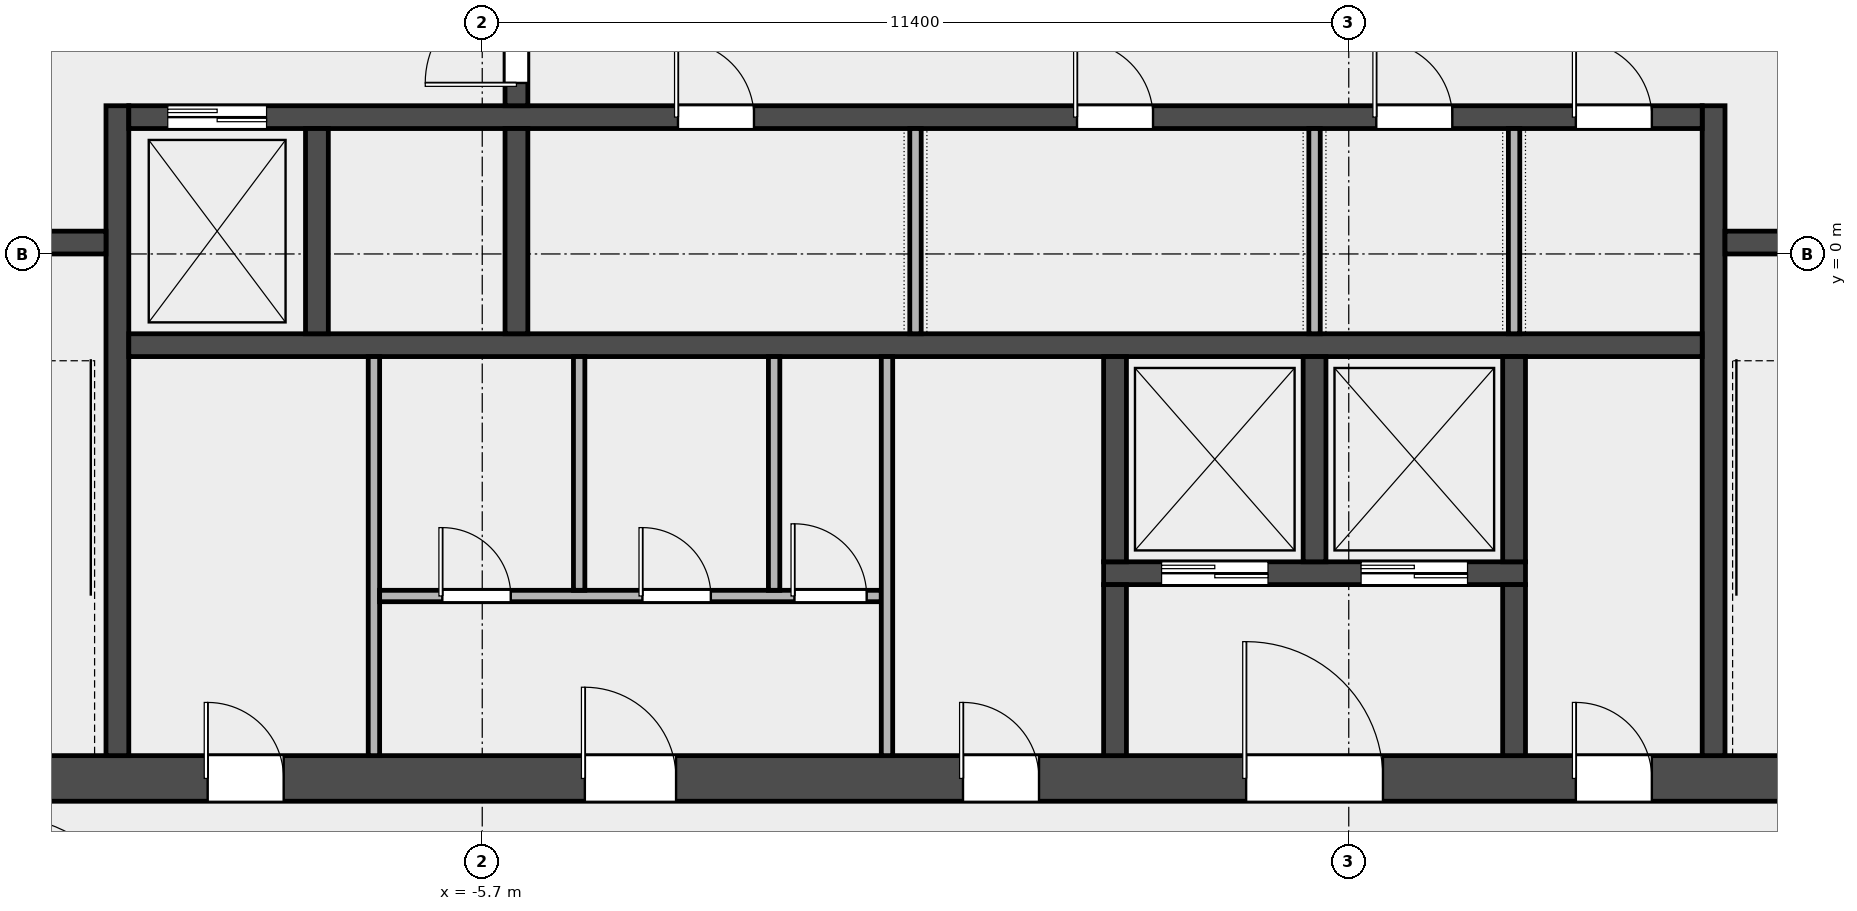
"""IFC4 building model, lengths in metres.
Left out: names, types, materials, properties, quantities, classifications, styles, units other than length and angle.
Written with IfcOpenShell. Run it as: python <this file> out.ifc"""

import sys

from ifc_helpers import new_model, si_unit, direction, frame, frame_2d, origin, place, context, subcontext, project, spatial, rectangle, extrude, element, fill, save


model = new_model("IFC4")
c1 = context("Model", 3, precision=1e-05, world=origin(), true_north=direction((0.0, 1.0)))
c2 = subcontext(c1, "Body", "Model", "MODEL_VIEW")
j1 = project(units=[si_unit("LENGTHUNIT", "METRE"), si_unit("PLANEANGLEUNIT", "RADIAN")], contexts=[c1])
p1 = place(None, origin())
s1 = spatial("IfcSite", under=j1, at=p1, CompositionType="ELEMENT")
p2 = place(p1, origin())
s2 = spatial("IfcBuilding", under=s1, at=p2, CompositionType="ELEMENT")
p3 = place(p2, frame((0.0, 0.0, 219.0)))
s3 = spatial("IfcBuildingStorey", under=s2, at=p3, CompositionType="ELEMENT", Elevation=219.0)
p4 = place(p3, frame((-14.4, -6.9, 0.0), z_axis=(0.0, 0.0, 1.0), x_axis=(1.0, 0.0, 0.0)))
e1 = element("IfcWall", 1, at=p4, inside=s3, PredefinedType="SHEAR", context=c2, shape_type="SweptSolid", body=[
    extrude(rectangle(XDim=28.8, YDim=0.6, at=frame_2d((14.4, 0.0))), origin(), (0.0, 0.0, 1.0), 3.7),
])
p5 = place(p4, frame((5.087, 0.0, 0.0)))
e2 = element("IfcOpeningElement", 2, at=p5, cuts=e1, PredefinedType="OPENING", context=c2, shape_type="SweptSolid", body=[
    extrude(rectangle(XDim=1.0, YDim=2.1, at=frame_2d((0.5, 1.05))), frame((0.0, 0.312, 0.0), z_axis=(0.0, -1.0, 0.0), x_axis=(1.0, 0.0, 0.0)), (0.0, 0.0, 1.0), 0.624),
])
p6 = place(p4, frame((10.05, 0.0, 0.0)))
e3 = element("IfcOpeningElement", 3, at=p6, cuts=e1, PredefinedType="OPENING", context=c2, shape_type="SweptSolid", body=[
    extrude(rectangle(XDim=1.2, YDim=2.1, at=frame_2d((0.6, 1.05))), frame((0.0, 0.312, 0.0), z_axis=(0.0, -1.0, 0.0), x_axis=(1.0, 0.0, 0.0)), (0.0, 0.0, 1.0), 0.624),
])
p7 = place(p4, frame((15.025, 0.0, 0.0)))
e4 = element("IfcOpeningElement", 4, at=p7, cuts=e1, PredefinedType="OPENING", context=c2, shape_type="SweptSolid", body=[
    extrude(rectangle(XDim=1.0, YDim=2.1, at=frame_2d((0.5, 1.05))), frame((0.0, 0.312, 0.0), z_axis=(0.0, -1.0, 0.0), x_axis=(1.0, 0.0, 0.0)), (0.0, 0.0, 1.0), 0.624),
])
p8 = place(p4, frame((18.75, 0.0, 0.0)))
e5 = element("IfcOpeningElement", 5, at=p8, cuts=e1, PredefinedType="OPENING", context=c2, shape_type="SweptSolid", body=[
    extrude(rectangle(XDim=1.8, YDim=2.1, at=frame_2d((0.9, 1.05))), frame((0.0, 0.312, 0.0), z_axis=(0.0, -1.0, 0.0), x_axis=(1.0, 0.0, 0.0)), (0.0, 0.0, 1.0), 0.624),
])
p9 = place(p4, frame((23.087, 0.0, 0.0)))
e6 = element("IfcOpeningElement", 6, at=p9, cuts=e1, PredefinedType="OPENING", context=c2, shape_type="SweptSolid", body=[
    extrude(rectangle(XDim=1.0, YDim=2.1, at=frame_2d((0.5, 1.05))), frame((0.0, 0.312, 0.0), z_axis=(0.0, -1.0, 0.0), x_axis=(1.0, 0.0, 0.0)), (0.0, 0.0, 1.0), 0.624),
])
for number, where, z_axis, x_axis in (
    (7, (-10.5, -6.6, 0.0), (0.0, 0.0, 1.0), (0.0, 1.0, 0.0)),
    (8, (10.5, -6.6, 0.0), (0.0, 0.0, 1.0), (0.0, 1.0, 0.0)),
):
    element("IfcWall", number, at=place(p3, frame(where, z_axis=z_axis, x_axis=x_axis)), inside=s3, PredefinedType="SHEAR", context=c2, shape_type="SweptSolid", body=[
        extrude(rectangle(XDim=8.55, YDim=0.3, at=frame_2d((4.275, 0.0))), origin(), (0.0, 0.0, 1.0), 3.7),
    ])
p10 = place(p3, frame((-13.8, 0.15, 0.0), z_axis=(0.0, 0.0, 1.0), x_axis=(1.0, 0.0, 0.0)))
e9 = element("IfcWall", 9, at=p10, inside=s3, PredefinedType="SOLIDWALL", context=c2, shape_type="SweptSolid", body=[
    extrude(rectangle(XDim=3.15, YDim=0.3, at=frame_2d((1.575, 0.0))), origin(), (0.0, 0.0, 1.0), 3.7),
])
p11 = place(p10, frame((0.975, 0.0, 0.0)))
e10 = element("IfcOpeningElement", 10, at=p11, cuts=e9, PredefinedType="OPENING", context=c2, shape_type="SweptSolid", body=[
    extrude(rectangle(XDim=1.1, YDim=2.1, at=frame_2d((0.55, 1.05))), frame((0.0, 0.162, 0.0), z_axis=(0.0, -1.0, 0.0), x_axis=(1.0, 0.0, 0.0)), (0.0, 0.0, 1.0), 0.324),
])
p12 = place(p3, frame((10.65, 0.15, 0.0), z_axis=(0.0, 0.0, 1.0), x_axis=(1.0, 0.0, 0.0)))
e11 = element("IfcWall", 11, at=p12, inside=s3, PredefinedType="SOLIDWALL", context=c2, shape_type="SweptSolid", body=[
    extrude(rectangle(XDim=3.15, YDim=0.3, at=frame_2d((1.575, 0.0))), origin(), (0.0, 0.0, 1.0), 3.7),
])
p13 = place(p12, frame((1.025, 0.0, 0.0)))
e12 = element("IfcOpeningElement", 12, at=p13, cuts=e11, PredefinedType="OPENING", context=c2, shape_type="SweptSolid", body=[
    extrude(rectangle(XDim=1.1, YDim=2.1, at=frame_2d((0.55, 1.05))), frame((0.0, 0.162, 0.0), z_axis=(0.0, -1.0, 0.0), x_axis=(1.0, 0.0, 0.0)), (0.0, 0.0, 1.0), 0.324),
])
p14 = place(p3, frame((-10.35, -1.2, 0.0), z_axis=(0.0, 0.0, 1.0), x_axis=(1.0, 0.0, 0.0)))
e13 = element("IfcWall", 13, at=p14, inside=s3, PredefinedType="SOLIDWALL", context=c2, shape_type="SweptSolid", body=[
    extrude(rectangle(XDim=20.7, YDim=0.3, at=frame_2d((10.35, 0.0))), origin(), (0.0, 0.0, 1.0), 3.7),
])
p15 = place(p3, frame((-10.35, 1.8, 0.0), z_axis=(0.0, 0.0, 1.0), x_axis=(1.0, 0.0, 0.0)))
e14 = element("IfcWall", 14, at=p15, inside=s3, PredefinedType="SOLIDWALL", context=c2, shape_type="SweptSolid", body=[
    extrude(rectangle(XDim=20.7, YDim=0.3, at=frame_2d((10.35, 0.0))), origin(), (0.0, 0.0, 1.0), 3.7),
])
p16 = place(p15, frame((0.512, 0.0, 0.0)))
e15 = element("IfcOpeningElement", 15, at=p16, cuts=e14, PredefinedType="OPENING", context=c2, shape_type="SweptSolid", body=[
    extrude(rectangle(XDim=1.3, YDim=2.1, at=frame_2d((0.65, 1.05))), frame((0.0, 0.162, 0.0), z_axis=(0.0, -1.0, 0.0), x_axis=(1.0, 0.0, 0.0)), (0.0, 0.0, 1.0), 0.324),
])
p17 = place(p15, frame((7.225, 0.0, 0.0)))
e16 = element("IfcOpeningElement", 16, at=p17, cuts=e14, PredefinedType="OPENING", context=c2, shape_type="SweptSolid", body=[
    extrude(rectangle(XDim=1.0, YDim=2.1, at=frame_2d((0.5, 1.05))), frame((0.0, 0.162, 0.0), z_axis=(0.0, -1.0, 0.0), x_axis=(1.0, 0.0, 0.0)), (0.0, 0.0, 1.0), 0.324),
])
p18 = place(p15, frame((12.475, 0.0, 0.0)))
e17 = element("IfcOpeningElement", 17, at=p18, cuts=e14, PredefinedType="OPENING", context=c2, shape_type="SweptSolid", body=[
    extrude(rectangle(XDim=1.0, YDim=2.1, at=frame_2d((0.5, 1.05))), frame((0.0, 0.162, 0.0), z_axis=(0.0, -1.0, 0.0), x_axis=(1.0, 0.0, 0.0)), (0.0, 0.0, 1.0), 0.324),
])
p19 = place(p15, frame((16.413, 0.0, 0.0)))
e18 = element("IfcOpeningElement", 18, at=p19, cuts=e14, PredefinedType="OPENING", context=c2, shape_type="SweptSolid", body=[
    extrude(rectangle(XDim=1.0, YDim=2.1, at=frame_2d((0.5, 1.05))), frame((0.0, 0.162, 0.0), z_axis=(0.0, -1.0, 0.0), x_axis=(1.0, 0.0, 0.0)), (0.0, 0.0, 1.0), 0.324),
])
p20 = place(p15, frame((19.038, 0.0, 0.0)))
e19 = element("IfcOpeningElement", 19, at=p20, cuts=e14, PredefinedType="OPENING", context=c2, shape_type="SweptSolid", body=[
    extrude(rectangle(XDim=1.0, YDim=2.1, at=frame_2d((0.5, 1.05))), frame((0.0, 0.162, 0.0), z_axis=(0.0, -1.0, 0.0), x_axis=(1.0, 0.0, 0.0)), (0.0, 0.0, 1.0), 0.324),
])
for number, where, z_axis, x_axis in (
    (20, (-7.875, -1.05, 0.0), (0.0, 0.0, 1.0), (0.0, 1.0, 0.0)),
    (21, (-5.25, -1.05, 0.0), (0.0, 0.0, 1.0), (0.0, 1.0, 0.0)),
):
    element("IfcWall", number, at=place(p3, frame(where, z_axis=z_axis, x_axis=x_axis)), inside=s3, PredefinedType="SOLIDWALL", context=c2, shape_type="SweptSolid", body=[
        extrude(rectangle(XDim=2.7, YDim=0.3, at=frame_2d((1.35, 0.0))), origin(), (0.0, 0.0, 1.0), 3.7),
    ])
p21 = place(p3, frame((-5.25, 1.95, 0.0), z_axis=(0.0, 0.0, 1.0), x_axis=(0.0, 1.0, 0.0)))
e22 = element("IfcWall", 22, at=p21, inside=s3, PredefinedType="SOLIDWALL", context=c2, shape_type="SweptSolid", body=[
    extrude(rectangle(XDim=3.3, YDim=0.3, at=frame_2d((1.65, 0.0))), origin(), (0.0, 0.0, 1.0), 3.7),
])
p22 = place(p21, frame((0.3, 0.0, 0.0)))
e23 = element("IfcOpeningElement", 23, at=p22, cuts=e22, PredefinedType="OPENING", context=c2, shape_type="SweptSolid", body=[
    extrude(rectangle(XDim=1.2, YDim=2.1, at=frame_2d((0.6, 1.05))), frame((0.0, 0.162, 0.0), z_axis=(0.0, -1.0, 0.0), x_axis=(1.0, 0.0, 0.0)), (0.0, 0.0, 1.0), 0.324),
])
p23 = place(p21, frame((1.8, 0.0, 0.0)))
e24 = element("IfcOpeningElement", 24, at=p23, cuts=e22, PredefinedType="OPENING", context=c2, shape_type="SweptSolid", body=[
    extrude(rectangle(XDim=1.2, YDim=2.1, at=frame_2d((0.6, 1.05))), frame((0.0, 0.162, 0.0), z_axis=(0.0, -1.0, 0.0), x_axis=(1.0, 0.0, 0.0)), (0.0, 0.0, 1.0), 0.324),
])
p24 = place(p3, frame((2.475, -4.2, 0.0), z_axis=(0.0, 0.0, 1.0), x_axis=(1.0, 0.0, 0.0)))
e25 = element("IfcWall", 25, at=p24, inside=s3, PredefinedType="SOLIDWALL", context=c2, shape_type="SweptSolid", body=[
    extrude(rectangle(XDim=5.55, YDim=0.3, at=frame_2d((2.775, 0.0))), origin(), (0.0, 0.0, 1.0), 3.7),
])
p25 = place(p24, frame((0.762, 0.0, 0.0)))
e26 = element("IfcOpeningElement", 26, at=p25, cuts=e25, PredefinedType="OPENING", context=c2, shape_type="SweptSolid", body=[
    extrude(rectangle(XDim=1.4, YDim=2.1, at=frame_2d((0.7, 1.05))), frame((0.0, 0.162, 0.0), z_axis=(0.0, -1.0, 0.0), x_axis=(1.0, 0.0, 0.0)), (0.0, 0.0, 1.0), 0.324),
])
p26 = place(p24, frame((3.387, 0.0, 0.0)))
e27 = element("IfcOpeningElement", 27, at=p26, cuts=e25, PredefinedType="OPENING", context=c2, shape_type="SweptSolid", body=[
    extrude(rectangle(XDim=1.4, YDim=2.1, at=frame_2d((0.7, 1.05))), frame((0.0, 0.162, 0.0), z_axis=(0.0, -1.0, 0.0), x_axis=(1.0, 0.0, 0.0)), (0.0, 0.0, 1.0), 0.324),
])
p27 = place(p3, frame((2.625, -4.05, 0.0), z_axis=(0.0, 0.0, 1.0), x_axis=(0.0, 1.0, 0.0)))
e28 = element("IfcWall", 28, at=p27, inside=s3, PredefinedType="SOLIDWALL", context=c2, shape_type="SweptSolid", body=[
    extrude(rectangle(XDim=2.7, YDim=0.3, at=frame_2d((1.35, 0.0))), origin(), (0.0, 0.0, 1.0), 3.7),
])
p28 = place(p3, frame((2.625, -6.6, 0.0), z_axis=(0.0, 0.0, 1.0), x_axis=(0.0, 1.0, 0.0)))
e29 = element("IfcWall", 29, at=p28, inside=s3, PredefinedType="SOLIDWALL", context=c2, shape_type="SweptSolid", body=[
    extrude(rectangle(XDim=2.25, YDim=0.3, at=frame_2d((1.125, 0.0))), origin(), (0.0, 0.0, 1.0), 3.7),
])
for number, where, z_axis, x_axis in (
    (30, (5.25, -4.05, 0.0), (0.0, 0.0, 1.0), (0.0, 1.0, 0.0)),
    (31, (7.875, -4.05, 0.0), (0.0, 0.0, 1.0), (0.0, 1.0, 0.0)),
):
    element("IfcWall", number, at=place(p3, frame(where, z_axis=z_axis, x_axis=x_axis)), inside=s3, PredefinedType="SOLIDWALL", context=c2, shape_type="SweptSolid", body=[
        extrude(rectangle(XDim=2.7, YDim=0.3, at=frame_2d((1.35, 0.0))), origin(), (0.0, 0.0, 1.0), 3.7),
    ])
p29 = place(p3, frame((7.875, -6.6, 0.0), z_axis=(0.0, 0.0, 1.0), x_axis=(0.0, 1.0, 0.0)))
e32 = element("IfcWall", 32, at=p29, inside=s3, PredefinedType="SOLIDWALL", context=c2, shape_type="SweptSolid", body=[
    extrude(rectangle(XDim=2.25, YDim=0.3, at=frame_2d((1.125, 0.0))), origin(), (0.0, 0.0, 1.0), 3.7),
])
p30 = place(p3, frame((-7.125, -6.6, 0.0), z_axis=(0.0, 0.0, 1.0), x_axis=(0.0, 1.0, 0.0)))
e33 = element("IfcWall", 33, at=p30, inside=s3, PredefinedType="PARTITIONING", context=c2, shape_type="SweptSolid", body=[
    extrude(rectangle(XDim=5.25, YDim=0.15, at=frame_2d((2.625, 0.0))), origin(), (0.0, 0.0, 1.0), 3.7),
])
p31 = place(p3, frame((-7.05, -4.5, 0.0), z_axis=(0.0, 0.0, 1.0), x_axis=(1.0, 0.0, 0.0)))
e34 = element("IfcWall", 34, at=p31, inside=s3, PredefinedType="PARTITIONING", context=c2, shape_type="SweptSolid", body=[
    extrude(rectangle(XDim=6.6, YDim=0.15, at=frame_2d((3.3, 0.0))), origin(), (0.0, 0.0, 1.0), 3.7),
])
p32 = place(p31, frame((0.825, 0.0, 0.0)))
e35 = element("IfcOpeningElement", 35, at=p32, cuts=e34, PredefinedType="OPENING", context=c2, shape_type="SweptSolid", body=[
    extrude(rectangle(XDim=0.9, YDim=2.1, at=frame_2d((0.45, 1.05))), frame((0.0, 0.087, 0.0), z_axis=(0.0, -1.0, 0.0), x_axis=(1.0, 0.0, 0.0)), (0.0, 0.0, 1.0), 0.174),
])
p33 = place(p31, frame((3.458, 0.0, 0.0)))
e36 = element("IfcOpeningElement", 36, at=p33, cuts=e34, PredefinedType="OPENING", context=c2, shape_type="SweptSolid", body=[
    extrude(rectangle(XDim=0.9, YDim=2.1, at=frame_2d((0.45, 1.05))), frame((0.0, 0.087, 0.0), z_axis=(0.0, -1.0, 0.0), x_axis=(1.0, 0.0, 0.0)), (0.0, 0.0, 1.0), 0.174),
])
p34 = place(p31, frame((5.458, 0.0, 0.0)))
e37 = element("IfcOpeningElement", 37, at=p34, cuts=e34, PredefinedType="OPENING", context=c2, shape_type="SweptSolid", body=[
    extrude(rectangle(XDim=0.95, YDim=2.1, at=frame_2d((0.475, 1.05))), frame((0.0, 0.087, 0.0), z_axis=(0.0, -1.0, 0.0), x_axis=(1.0, 0.0, 0.0)), (0.0, 0.0, 1.0), 0.174),
])
for number, where, z_axis, x_axis in (
    (38, (-4.425, -4.425, 0.0), (0.0, 0.0, 1.0), (0.0, 1.0, 0.0)),
    (39, (-1.86, -4.425, 0.0), (0.0, 0.0, 1.0), (0.0, 1.0, 0.0)),
):
    element("IfcWall", number, at=place(p3, frame(where, z_axis=z_axis, x_axis=x_axis)), inside=s3, PredefinedType="PARTITIONING", context=c2, shape_type="SweptSolid", body=[
        extrude(rectangle(XDim=3.075, YDim=0.15, at=frame_2d((1.538, 0.0))), origin(), (0.0, 0.0, 1.0), 3.7),
    ])
p35 = place(p3, frame((-0.375, -6.6, 0.0), z_axis=(0.0, 0.0, 1.0), x_axis=(0.0, 1.0, 0.0)))
e40 = element("IfcWall", 40, at=p35, inside=s3, PredefinedType="PARTITIONING", context=c2, shape_type="SweptSolid", body=[
    extrude(rectangle(XDim=5.25, YDim=0.15, at=frame_2d((2.625, 0.0))), origin(), (0.0, 0.0, 1.0), 3.7),
])
for number, where, z_axis, x_axis in (
    (41, (0.0, -1.05, 0.0), (0.0, 0.0, 1.0), (0.0, 1.0, 0.0)),
    (42, (5.25, -1.05, 0.0), (0.0, 0.0, 1.0), (0.0, 1.0, 0.0)),
    (43, (7.875, -1.05, 0.0), (0.0, 0.0, 1.0), (0.0, 1.0, 0.0)),
):
    element("IfcWall", number, at=place(p3, frame(where, z_axis=z_axis, x_axis=x_axis)), inside=s3, PredefinedType="PARTITIONING", context=c2, shape_type="SweptSolid", body=[
        extrude(rectangle(XDim=2.7, YDim=0.15, at=frame_2d((1.35, 0.0))), origin(), (0.0, 0.0, 1.0), 3.7),
    ])
p36 = place(p22, origin())
e44 = element("IfcDoor", 44, at=p36, inside=s3, OperationType="SINGLE_SWING_LEFT", PredefinedType="DOOR", context=c2, shape_type="SweptSolid", body=[
    extrude(rectangle(XDim=1.2, YDim=2.1, at=frame_2d((0.6, 1.05))), frame((0.0, 0.025, 0.0), z_axis=(0.0, -1.0, 0.0), x_axis=(1.0, 0.0, 0.0)), (0.0, 0.0, 1.0), 0.05),
])
fill(e23, e44)
p37 = place(p16, origin())
e45 = element("IfcDoor", 45, at=p37, inside=s3, OperationType="DOUBLE_DOOR_SLIDING", PredefinedType="DOOR", context=c2, shape_type="SweptSolid", body=[
    extrude(rectangle(XDim=1.3, YDim=2.1, at=frame_2d((0.65, 1.05))), frame((0.0, 0.025, 0.0), z_axis=(0.0, -1.0, 0.0), x_axis=(1.0, 0.0, 0.0)), (0.0, 0.0, 1.0), 0.05),
])
fill(e15, e45)
p38 = place(p25, origin())
e46 = element("IfcDoor", 46, at=p38, inside=s3, OperationType="DOUBLE_DOOR_SLIDING", PredefinedType="DOOR", context=c2, shape_type="SweptSolid", body=[
    extrude(rectangle(XDim=1.4, YDim=2.1, at=frame_2d((0.7, 1.05))), frame((0.0, 0.025, 0.0), z_axis=(0.0, -1.0, 0.0), x_axis=(1.0, 0.0, 0.0)), (0.0, 0.0, 1.0), 0.05),
])
fill(e26, e46)
p39 = place(p26, origin())
e47 = element("IfcDoor", 47, at=p39, inside=s3, OperationType="DOUBLE_DOOR_SLIDING", PredefinedType="DOOR", context=c2, shape_type="SweptSolid", body=[
    extrude(rectangle(XDim=1.4, YDim=2.1, at=frame_2d((0.7, 1.05))), frame((0.0, 0.025, 0.0), z_axis=(0.0, -1.0, 0.0), x_axis=(1.0, 0.0, 0.0)), (0.0, 0.0, 1.0), 0.05),
])
fill(e27, e47)
p40 = place(p5, origin())
e48 = element("IfcDoor", 48, at=p40, inside=s3, OperationType="SINGLE_SWING_LEFT", PredefinedType="DOOR", context=c2, shape_type="SweptSolid", body=[
    extrude(rectangle(XDim=1.0, YDim=2.1, at=frame_2d((0.5, 1.05))), frame((0.0, 0.025, 0.0), z_axis=(0.0, -1.0, 0.0), x_axis=(1.0, 0.0, 0.0)), (0.0, 0.0, 1.0), 0.05),
])
fill(e2, e48)
p41 = place(p6, origin())
e49 = element("IfcDoor", 49, at=p41, inside=s3, OperationType="SINGLE_SWING_LEFT", PredefinedType="DOOR", context=c2, shape_type="SweptSolid", body=[
    extrude(rectangle(XDim=1.2, YDim=2.1, at=frame_2d((0.6, 1.05))), frame((0.0, 0.025, 0.0), z_axis=(0.0, -1.0, 0.0), x_axis=(1.0, 0.0, 0.0)), (0.0, 0.0, 1.0), 0.05),
])
fill(e3, e49)
p42 = place(p32, origin())
e50 = element("IfcDoor", 50, at=p42, inside=s3, OperationType="SINGLE_SWING_LEFT", PredefinedType="DOOR", context=c2, shape_type="SweptSolid", body=[
    extrude(rectangle(XDim=0.9, YDim=2.1, at=frame_2d((0.45, 1.05))), frame((0.0, 0.025, 0.0), z_axis=(0.0, -1.0, 0.0), x_axis=(1.0, 0.0, 0.0)), (0.0, 0.0, 1.0), 0.05),
])
fill(e35, e50)
p43 = place(p33, origin())
e51 = element("IfcDoor", 51, at=p43, inside=s3, OperationType="SINGLE_SWING_LEFT", PredefinedType="DOOR", context=c2, shape_type="SweptSolid", body=[
    extrude(rectangle(XDim=0.9, YDim=2.1, at=frame_2d((0.45, 1.05))), frame((0.0, 0.025, 0.0), z_axis=(0.0, -1.0, 0.0), x_axis=(1.0, 0.0, 0.0)), (0.0, 0.0, 1.0), 0.05),
])
fill(e36, e51)
p44 = place(p34, origin())
e52 = element("IfcDoor", 52, at=p44, inside=s3, OperationType="SINGLE_SWING_LEFT", PredefinedType="DOOR", context=c2, shape_type="SweptSolid", body=[
    extrude(rectangle(XDim=0.95, YDim=2.1, at=frame_2d((0.475, 1.05))), frame((0.0, 0.025, 0.0), z_axis=(0.0, -1.0, 0.0), x_axis=(1.0, 0.0, 0.0)), (0.0, 0.0, 1.0), 0.05),
])
fill(e37, e52)
p45 = place(p7, origin())
e53 = element("IfcDoor", 53, at=p45, inside=s3, OperationType="SINGLE_SWING_LEFT", PredefinedType="DOOR", context=c2, shape_type="SweptSolid", body=[
    extrude(rectangle(XDim=1.0, YDim=2.1, at=frame_2d((0.5, 1.05))), frame((0.0, 0.025, 0.0), z_axis=(0.0, -1.0, 0.0), x_axis=(1.0, 0.0, 0.0)), (0.0, 0.0, 1.0), 0.05),
])
fill(e4, e53)
p46 = place(p8, origin())
e54 = element("IfcDoor", 54, at=p46, inside=s3, OperationType="DOUBLE_DOOR_SINGLE_SWING", PredefinedType="DOOR", context=c2, shape_type="SweptSolid", body=[
    extrude(rectangle(XDim=1.8, YDim=2.1, at=frame_2d((0.9, 1.05))), frame((0.0, 0.025, 0.0), z_axis=(0.0, -1.0, 0.0), x_axis=(1.0, 0.0, 0.0)), (0.0, 0.0, 1.0), 0.05),
])
fill(e5, e54)
p47 = place(p9, origin())
e55 = element("IfcDoor", 55, at=p47, inside=s3, OperationType="SINGLE_SWING_LEFT", PredefinedType="DOOR", context=c2, shape_type="SweptSolid", body=[
    extrude(rectangle(XDim=1.0, YDim=2.1, at=frame_2d((0.5, 1.05))), frame((0.0, 0.025, 0.0), z_axis=(0.0, -1.0, 0.0), x_axis=(1.0, 0.0, 0.0)), (0.0, 0.0, 1.0), 0.05),
])
fill(e6, e55)
p48 = place(p17, origin())
e56 = element("IfcDoor", 56, at=p48, inside=s3, OperationType="SINGLE_SWING_LEFT", PredefinedType="DOOR", context=c2, shape_type="SweptSolid", body=[
    extrude(rectangle(XDim=1.0, YDim=2.1, at=frame_2d((0.5, 1.05))), frame((0.0, 0.025, 0.0), z_axis=(0.0, -1.0, 0.0), x_axis=(1.0, 0.0, 0.0)), (0.0, 0.0, 1.0), 0.05),
])
fill(e16, e56)
p49 = place(p18, origin())
e57 = element("IfcDoor", 57, at=p49, inside=s3, OperationType="SINGLE_SWING_LEFT", PredefinedType="DOOR", context=c2, shape_type="SweptSolid", body=[
    extrude(rectangle(XDim=1.0, YDim=2.1, at=frame_2d((0.5, 1.05))), frame((0.0, 0.025, 0.0), z_axis=(0.0, -1.0, 0.0), x_axis=(1.0, 0.0, 0.0)), (0.0, 0.0, 1.0), 0.05),
])
fill(e17, e57)
p50 = place(p19, origin())
e58 = element("IfcDoor", 58, at=p50, inside=s3, OperationType="SINGLE_SWING_LEFT", PredefinedType="DOOR", context=c2, shape_type="SweptSolid", body=[
    extrude(rectangle(XDim=1.0, YDim=2.1, at=frame_2d((0.5, 1.05))), frame((0.0, 0.025, 0.0), z_axis=(0.0, -1.0, 0.0), x_axis=(1.0, 0.0, 0.0)), (0.0, 0.0, 1.0), 0.05),
])
fill(e18, e58)
p51 = place(p20, origin())
e59 = element("IfcDoor", 59, at=p51, inside=s3, OperationType="SINGLE_SWING_LEFT", PredefinedType="DOOR", context=c2, shape_type="SweptSolid", body=[
    extrude(rectangle(XDim=1.0, YDim=2.1, at=frame_2d((0.5, 1.05))), frame((0.0, 0.025, 0.0), z_axis=(0.0, -1.0, 0.0), x_axis=(1.0, 0.0, 0.0)), (0.0, 0.0, 1.0), 0.05),
])
fill(e19, e59)
save(model, sys.argv[1])
